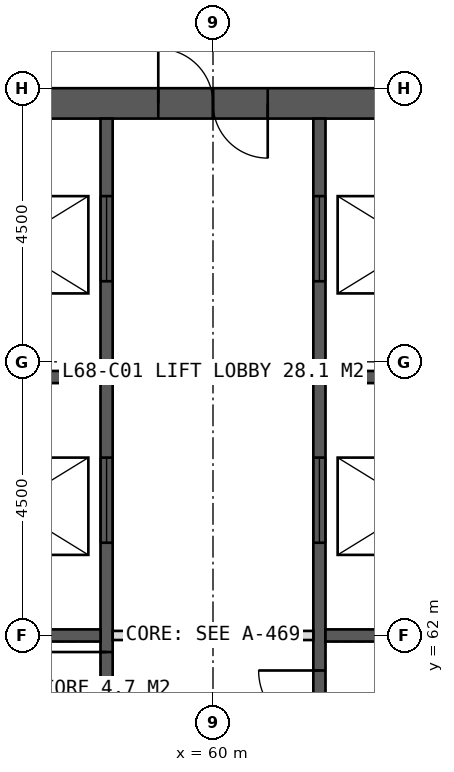
"""IFC4 building model, lengths in metres.
Left out: names, types, materials, properties, quantities, classifications, styles, units other than length and angle.
Written with IfcOpenShell. Run it as: python <this file> out.ifc"""

import sys

from ifc_helpers import new_model, si_unit, direction, frame, frame_2d, origin, place, context, subcontext, project, spatial, rectangle, extrude, element, fill, save


model = new_model("IFC4")
c1 = context("Model", 3, precision=1e-05, world=origin(), true_north=direction((0.0, 1.0)))
c2 = subcontext(c1, "Body", "Model", "MODEL_VIEW")
j1 = project(units=[si_unit("LENGTHUNIT", "METRE"), si_unit("PLANEANGLEUNIT", "RADIAN")], contexts=[c1])
p1 = place(None, origin())
s1 = spatial("IfcSite", under=j1, at=p1, CompositionType="ELEMENT")
p2 = place(p1, origin())
s2 = spatial("IfcBuilding", under=s1, at=p2, CompositionType="ELEMENT")
p3 = place(p2, frame((0.0, 0.0, 282.0)))
s3 = spatial("IfcBuildingStorey", under=s2, at=p3, CompositionType="ELEMENT", Elevation=282.0)
p4 = place(p3, frame((51.0, 70.75, 0.0), z_axis=(0.0, 0.0, 1.0), x_axis=(1.0, 0.0, 0.0)))
e1 = element("IfcWall", 1, at=p4, inside=s3, PredefinedType="SHEAR", context=c2, shape_type="SweptSolid", body=[
    extrude(rectangle(XDim=18.0, YDim=0.5, at=frame_2d((9.0, 0.0))), origin(), (0.0, 0.0, 1.0), 4.0),
])
p5 = place(p4, frame((8.1, 0.0, 0.0)))
e2 = element("IfcOpeningElement", 2, at=p5, cuts=e1, PredefinedType="OPENING", context=c2, shape_type="SweptSolid", body=[
    extrude(rectangle(XDim=1.8, YDim=2.2, at=frame_2d((0.9, 1.1))), frame((0.0, 0.26, 0.0), z_axis=(0.0, -1.0, 0.0), x_axis=(1.0, 0.0, 0.0)), (0.0, 0.0, 1.0), 0.52),
])
p6 = place(p3, frame((58.25, 53.5, 0.0), z_axis=(0.0, 0.0, 1.0), x_axis=(0.0, 1.0, 0.0)))
e3 = element("IfcWall", 3, at=p6, inside=s3, PredefinedType="SHEAR", context=c2, shape_type="SweptSolid", body=[
    extrude(rectangle(XDim=17.0, YDim=0.2, at=frame_2d((8.5, 0.0))), origin(), (0.0, 0.0, 1.0), 4.0),
])
p7 = place(p6, frame((0.393, 0.0, 0.0)))
e4 = element("IfcOpeningElement", 4, at=p7, cuts=e3, PredefinedType="OPENING", context=c2, shape_type="SweptSolid", body=[
    extrude(rectangle(XDim=1.0, YDim=2.1, at=frame_2d((0.5, 1.05))), frame((0.0, 0.11, 0.0), z_axis=(0.0, -1.0, 0.0), x_axis=(1.0, 0.0, 0.0)), (0.0, 0.0, 1.0), 0.22),
])
p8 = place(p6, frame((2.542, 0.0, 0.0)))
e5 = element("IfcOpeningElement", 5, at=p8, cuts=e3, PredefinedType="OPENING", context=c2, shape_type="SweptSolid", body=[
    extrude(rectangle(XDim=1.0, YDim=2.1, at=frame_2d((0.5, 1.05))), frame((0.0, 0.11, 0.0), z_axis=(0.0, -1.0, 0.0), x_axis=(1.0, 0.0, 0.0)), (0.0, 0.0, 1.0), 0.22),
])
p9 = place(p6, frame((5.127, 0.0, 0.0)))
e6 = element("IfcOpeningElement", 6, at=p9, cuts=e3, PredefinedType="OPENING", context=c2, shape_type="SweptSolid", body=[
    extrude(rectangle(XDim=1.0, YDim=2.1, at=frame_2d((0.5, 1.05))), frame((0.0, 0.11, 0.0), z_axis=(0.0, -1.0, 0.0), x_axis=(1.0, 0.0, 0.0)), (0.0, 0.0, 1.0), 0.22),
])
p10 = place(p6, frame((7.228, 0.0, 0.0)))
e7 = element("IfcOpeningElement", 7, at=p10, cuts=e3, PredefinedType="OPENING", context=c2, shape_type="SweptSolid", body=[
    extrude(rectangle(XDim=1.0, YDim=2.1, at=frame_2d((0.5, 1.05))), frame((0.0, 0.11, 0.0), z_axis=(0.0, -1.0, 0.0), x_axis=(1.0, 0.0, 0.0)), (0.0, 0.0, 1.0), 0.22),
])
p11 = place(p6, frame((10.025, 0.0, 0.0)))
e8 = element("IfcOpeningElement", 8, at=p11, cuts=e3, PredefinedType="OPENING", context=c2, shape_type="SweptSolid", body=[
    extrude(rectangle(XDim=1.4, YDim=2.2, at=frame_2d((0.7, 1.1))), frame((0.0, 0.11, 0.0), z_axis=(0.0, -1.0, 0.0), x_axis=(1.0, 0.0, 0.0)), (0.0, 0.0, 1.0), 0.22),
])
p12 = place(p6, frame((14.325, 0.0, 0.0)))
e9 = element("IfcOpeningElement", 9, at=p12, cuts=e3, PredefinedType="OPENING", context=c2, shape_type="SweptSolid", body=[
    extrude(rectangle(XDim=1.4, YDim=2.2, at=frame_2d((0.7, 1.1))), frame((0.0, 0.11, 0.0), z_axis=(0.0, -1.0, 0.0), x_axis=(1.0, 0.0, 0.0)), (0.0, 0.0, 1.0), 0.22),
])
p13 = place(p3, frame((61.75, 53.5, 0.0), z_axis=(0.0, 0.0, 1.0), x_axis=(0.0, 1.0, 0.0)))
e10 = element("IfcWall", 10, at=p13, inside=s3, PredefinedType="SHEAR", context=c2, shape_type="SweptSolid", body=[
    extrude(rectangle(XDim=17.0, YDim=0.2, at=frame_2d((8.5, 0.0))), origin(), (0.0, 0.0, 1.0), 4.0),
])
p14 = place(p13, frame((0.6, 0.0, 0.0)))
e11 = element("IfcOpeningElement", 11, at=p14, cuts=e10, PredefinedType="OPENING", context=c2, shape_type="SweptSolid", body=[
    extrude(rectangle(XDim=1.0, YDim=2.1, at=frame_2d((0.5, 1.05))), frame((0.0, 0.11, 0.0), z_axis=(0.0, -1.0, 0.0), x_axis=(1.0, 0.0, 0.0)), (0.0, 0.0, 1.0), 0.22),
])
p15 = place(p13, frame((2.75, 0.0, 0.0)))
e12 = element("IfcOpeningElement", 12, at=p15, cuts=e10, PredefinedType="OPENING", context=c2, shape_type="SweptSolid", body=[
    extrude(rectangle(XDim=1.0, YDim=2.1, at=frame_2d((0.5, 1.05))), frame((0.0, 0.11, 0.0), z_axis=(0.0, -1.0, 0.0), x_axis=(1.0, 0.0, 0.0)), (0.0, 0.0, 1.0), 0.22),
])
p16 = place(p13, frame((4.824, 0.0, 0.0)))
e13 = element("IfcOpeningElement", 13, at=p16, cuts=e10, PredefinedType="OPENING", context=c2, shape_type="SweptSolid", body=[
    extrude(rectangle(XDim=1.0, YDim=2.1, at=frame_2d((0.5, 1.05))), frame((0.0, 0.11, 0.0), z_axis=(0.0, -1.0, 0.0), x_axis=(1.0, 0.0, 0.0)), (0.0, 0.0, 1.0), 0.22),
])
p17 = place(p13, frame((6.924, 0.0, 0.0)))
e14 = element("IfcOpeningElement", 14, at=p17, cuts=e10, PredefinedType="OPENING", context=c2, shape_type="SweptSolid", body=[
    extrude(rectangle(XDim=1.0, YDim=2.1, at=frame_2d((0.5, 1.05))), frame((0.0, 0.11, 0.0), z_axis=(0.0, -1.0, 0.0), x_axis=(1.0, 0.0, 0.0)), (0.0, 0.0, 1.0), 0.22),
])
p18 = place(p13, frame((10.025, 0.0, 0.0)))
e15 = element("IfcOpeningElement", 15, at=p18, cuts=e10, PredefinedType="OPENING", context=c2, shape_type="SweptSolid", body=[
    extrude(rectangle(XDim=1.4, YDim=2.2, at=frame_2d((0.7, 1.1))), frame((0.0, 0.11, 0.0), z_axis=(0.0, -1.0, 0.0), x_axis=(1.0, 0.0, 0.0)), (0.0, 0.0, 1.0), 0.22),
])
p19 = place(p13, frame((14.325, 0.0, 0.0)))
e16 = element("IfcOpeningElement", 16, at=p19, cuts=e10, PredefinedType="OPENING", context=c2, shape_type="SweptSolid", body=[
    extrude(rectangle(XDim=1.4, YDim=2.2, at=frame_2d((0.7, 1.1))), frame((0.0, 0.11, 0.0), z_axis=(0.0, -1.0, 0.0), x_axis=(1.0, 0.0, 0.0)), (0.0, 0.0, 1.0), 0.22),
])
for number, where, z_axis, x_axis in (
    (17, (55.1, 62.0, 0.0), (0.0, 0.0, 1.0), (1.0, 0.0, 0.0)),
    (18, (61.85, 62.0, 0.0), (0.0, 0.0, 1.0), (1.0, 0.0, 0.0)),
    (19, (55.1, 66.25, 0.0), (0.0, 0.0, 1.0), (1.0, 0.0, 0.0)),
    (20, (61.85, 66.25, 0.0), (0.0, 0.0, 1.0), (1.0, 0.0, 0.0)),
):
    element("IfcWall", number, at=place(p3, frame(where, z_axis=z_axis, x_axis=x_axis)), inside=s3, PredefinedType="SHEAR", context=c2, shape_type="SweptSolid", body=[
        extrude(rectangle(XDim=3.05, YDim=0.2, at=frame_2d((1.525, 0.0))), origin(), (0.0, 0.0, 1.0), 4.0),
    ])
p20 = place(p3, frame((58.35, 62.0, 0.0), z_axis=(0.0, 0.0, 1.0), x_axis=(1.0, 0.0, 0.0)))
e21 = element("IfcWall", 21, at=p20, inside=s3, PredefinedType="PARTITIONING", context=c2, shape_type="SweptSolid", body=[
    extrude(rectangle(XDim=3.3, YDim=0.15, at=frame_2d((1.65, 0.0))), origin(), (0.0, 0.0, 1.0), 3.75),
])
p21 = place(p5, origin())
e22 = element("IfcDoor", 22, at=p21, inside=s3, OperationType="DOUBLE_DOOR_SINGLE_SWING", PredefinedType="DOOR", context=c2, shape_type="SweptSolid", body=[
    extrude(rectangle(XDim=1.8, YDim=2.2, at=frame_2d((0.9, 1.1))), frame((0.0, 0.025, 0.0), z_axis=(0.0, -1.0, 0.0), x_axis=(1.0, 0.0, 0.0)), (0.0, 0.0, 1.0), 0.05),
])
fill(e2, e22)
p22 = place(p10, origin())
e23 = element("IfcDoor", 23, at=p22, inside=s3, OperationType="SINGLE_SWING_RIGHT", PredefinedType="DOOR", context=c2, shape_type="SweptSolid", body=[
    extrude(rectangle(XDim=1.0, YDim=2.1, at=frame_2d((0.5, 1.05))), frame((0.0, 0.025, 0.0), z_axis=(0.0, -1.0, 0.0), x_axis=(1.0, 0.0, 0.0)), (0.0, 0.0, 1.0), 0.05),
])
fill(e7, e23)
p23 = place(p17, origin())
e24 = element("IfcDoor", 24, at=p23, inside=s3, OperationType="SINGLE_SWING_RIGHT", PredefinedType="DOOR", context=c2, shape_type="SweptSolid", body=[
    extrude(rectangle(XDim=1.0, YDim=2.1, at=frame_2d((0.5, 1.05))), frame((0.0, 0.025, 0.0), z_axis=(0.0, -1.0, 0.0), x_axis=(1.0, 0.0, 0.0)), (0.0, 0.0, 1.0), 0.05),
])
fill(e14, e24)
p24 = place(p11, origin())
e25 = element("IfcDoor", 25, at=p24, inside=s3, OperationType="SLIDING_TO_LEFT", PredefinedType="DOOR", context=c2, shape_type="SweptSolid", body=[
    extrude(rectangle(XDim=1.4, YDim=2.2, at=frame_2d((0.7, 1.1))), frame((0.0, 0.025, 0.0), z_axis=(0.0, -1.0, 0.0), x_axis=(1.0, 0.0, 0.0)), (0.0, 0.0, 1.0), 0.05),
])
fill(e8, e25)
p25 = place(p18, origin())
e26 = element("IfcDoor", 26, at=p25, inside=s3, OperationType="SLIDING_TO_LEFT", PredefinedType="DOOR", context=c2, shape_type="SweptSolid", body=[
    extrude(rectangle(XDim=1.4, YDim=2.2, at=frame_2d((0.7, 1.1))), frame((0.0, 0.025, 0.0), z_axis=(0.0, -1.0, 0.0), x_axis=(1.0, 0.0, 0.0)), (0.0, 0.0, 1.0), 0.05),
])
fill(e15, e26)
p26 = place(p12, origin())
e27 = element("IfcDoor", 27, at=p26, inside=s3, OperationType="SLIDING_TO_LEFT", PredefinedType="DOOR", context=c2, shape_type="SweptSolid", body=[
    extrude(rectangle(XDim=1.4, YDim=2.2, at=frame_2d((0.7, 1.1))), frame((0.0, 0.025, 0.0), z_axis=(0.0, -1.0, 0.0), x_axis=(1.0, 0.0, 0.0)), (0.0, 0.0, 1.0), 0.05),
])
fill(e9, e27)
p27 = place(p19, origin())
e28 = element("IfcDoor", 28, at=p27, inside=s3, OperationType="SLIDING_TO_LEFT", PredefinedType="DOOR", context=c2, shape_type="SweptSolid", body=[
    extrude(rectangle(XDim=1.4, YDim=2.2, at=frame_2d((0.7, 1.1))), frame((0.0, 0.025, 0.0), z_axis=(0.0, -1.0, 0.0), x_axis=(1.0, 0.0, 0.0)), (0.0, 0.0, 1.0), 0.05),
])
fill(e16, e28)
save(model, sys.argv[1])
